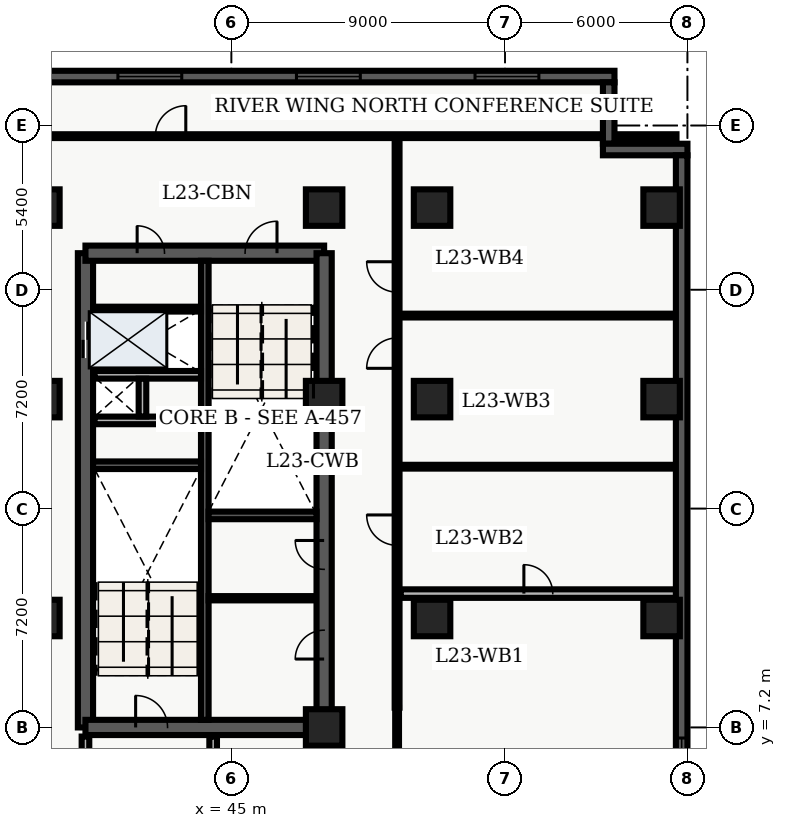
"""IFC4 building model, lengths in metres.
Left out: names, types, materials, properties, quantities, classifications, styles, units other than length and angle.
Written with IfcOpenShell. Run it as: python <this file> out.ifc"""

import sys

from ifc_helpers import new_model, entity, si_unit, converted_unit, direction, frame, origin_with_axes, origin_2d_with_axis, place, context, subcontext, project, spatial, polyline, rectangle, outline, extrude, element, fill, save


model = new_model("IFC4")
c1 = context("Model", 3, precision=1e-05, world=origin_with_axes(), true_north=direction((0.0, 1.0)))
c2 = subcontext(c1, "Body", "Model", "MODEL_VIEW")
j1 = project(units=[si_unit("LENGTHUNIT", "METRE"), converted_unit("PLANEANGLEUNIT", "DEGREE", entity("IfcPlaneAngleMeasure", 0.017), si_unit("PLANEANGLEUNIT", "RADIAN"), dimensions=[0, 0, 0, 0, 0, 0, 0])], contexts=[c1])
p1 = place(None, origin_with_axes())
s1 = spatial("IfcSite", under=j1, at=p1, CompositionType="ELEMENT")
p2 = place(p1, origin_with_axes())
s2 = spatial("IfcBuilding", under=s1, at=p2, CompositionType="ELEMENT")
p3 = place(p2, frame((0.0, 0.0, 96.9), z_axis=(0.0, 0.0, 1.0), x_axis=(1.0, 0.0, 0.0)))
s3 = spatial("IfcBuildingStorey", under=s2, at=p3, CompositionType="ELEMENT", Elevation=96.9)
p4 = place(p3, frame((40.2, 7.2, 0.0), z_axis=(0.0, 0.0, 1.0), x_axis=(0.0, 1.0, 0.0)))
e1 = element("IfcWall", 1, at=p4, inside=s3, PredefinedType="SHEAR", context=c2, shape_type="SweptSolid", body=[
    extrude(outline(polyline([(0.0, -0.25), (15.6, -0.25), (15.6, 0.25), (0.0, 0.25), (0.0, -0.25)])), origin_with_axes(), (0.0, 0.0, 1.0), 3.66),
])
p5 = place(p4, frame((12.75, 0.0, 0.0), z_axis=(0.0, 0.0, 1.0), x_axis=(1.0, 0.0, 0.0)))
e2 = element("IfcOpeningElement", 2, at=p5, cuts=e1, PredefinedType="OPENING", context=c2, shape_type="SweptSolid", body=[
    extrude(rectangle(XDim=1.2, YDim=0.52, at=origin_2d_with_axis()), origin_with_axes(), (0.0, 0.0, 1.0), 2.15),
])
p6 = place(p3, frame((40.2, 7.2, 0.0), z_axis=(0.0, 0.0, 1.0), x_axis=(1.0, 0.0, 0.0)))
e3 = element("IfcWall", 3, at=p6, inside=s3, PredefinedType="SHEAR", context=c2, shape_type="SweptSolid", body=[
    extrude(outline(polyline([(0.0, -0.25), (7.85, -0.25), (7.85, 0.25), (0.0, 0.25), (0.0, -0.25)])), origin_with_axes(), (0.0, 0.0, 1.0), 3.66),
])
p7 = place(p6, frame((2.175, 0.0, 0.0), z_axis=(0.0, 0.0, 1.0), x_axis=(1.0, 0.0, 0.0)))
e4 = element("IfcOpeningElement", 4, at=p7, cuts=e3, PredefinedType="OPENING", context=c2, shape_type="SweptSolid", body=[
    extrude(rectangle(XDim=1.05, YDim=0.52, at=origin_2d_with_axis()), origin_with_axes(), (0.0, 0.0, 1.0), 2.15),
])
p8 = place(p3, frame((40.2, 22.8, 0.0), z_axis=(0.0, 0.0, 1.0), x_axis=(1.0, 0.0, 0.0)))
e5 = element("IfcWall", 5, at=p8, inside=s3, PredefinedType="SHEAR", context=c2, shape_type="SweptSolid", body=[
    extrude(outline(polyline([(0.0, -0.25), (7.85, -0.25), (7.85, 0.25), (0.0, 0.25), (0.0, -0.25)])), origin_with_axes(), (0.0, 0.0, 1.0), 3.66),
])
p9 = place(p8, frame((5.775, 0.0, 0.0), z_axis=(0.0, 0.0, 1.0), x_axis=(1.0, 0.0, 0.0)))
e6 = element("IfcOpeningElement", 6, at=p9, cuts=e5, PredefinedType="OPENING", context=c2, shape_type="SweptSolid", body=[
    extrude(rectangle(XDim=1.05, YDim=0.52, at=origin_2d_with_axis()), origin_with_axes(), (0.0, 0.0, 1.0), 2.15),
])
p10 = place(p8, frame((2.15, 0.0, 0.0), z_axis=(0.0, 0.0, 1.0), x_axis=(1.0, 0.0, 0.0)))
e7 = element("IfcOpeningElement", 7, at=p10, cuts=e5, PredefinedType="OPENING", context=c2, shape_type="SweptSolid", body=[
    extrude(rectangle(XDim=0.9, YDim=0.52, at=origin_2d_with_axis()), origin_with_axes(), (0.0, 0.0, 1.0), 2.15),
])
p11 = place(p3, frame((48.05, 7.2, 0.0), z_axis=(0.0, 0.0, 1.0), x_axis=(0.0, 1.0, 0.0)))
e8 = element("IfcWall", 8, at=p11, inside=s3, PredefinedType="SHEAR", context=c2, shape_type="SweptSolid", body=[
    extrude(outline(polyline([(0.0, -0.25), (15.6, -0.25), (15.6, 0.25), (0.0, 0.25), (0.0, -0.25)])), origin_with_axes(), (0.0, 0.0, 1.0), 3.66),
])
p12 = place(p11, frame((2.725, 0.0, 0.0), z_axis=(0.0, 0.0, 1.0), x_axis=(1.0, 0.0, 0.0)))
e9 = element("IfcOpeningElement", 9, at=p12, cuts=e8, PredefinedType="OPENING", context=c2, shape_type="SweptSolid", body=[
    extrude(rectangle(XDim=0.95, YDim=0.52, at=origin_2d_with_axis()), origin_with_axes(), (0.0, 0.0, 1.0), 2.15),
])
p13 = place(p11, frame((5.675, 0.0, 0.0), z_axis=(0.0, 0.0, 1.0), x_axis=(1.0, 0.0, 0.0)))
e10 = element("IfcOpeningElement", 10, at=p13, cuts=e8, PredefinedType="OPENING", context=c2, shape_type="SweptSolid", body=[
    extrude(rectangle(XDim=0.95, YDim=0.52, at=origin_2d_with_axis()), origin_with_axes(), (0.0, 0.0, 1.0), 2.15),
])
p14 = place(p3, frame((44.125, 7.45, 0.0), z_axis=(0.0, 0.0, 1.0), x_axis=(0.0, 1.0, 0.0)))
e11 = element("IfcWall", 11, at=p14, inside=s3, PredefinedType="SHEAR", context=c2, shape_type="SweptSolid", body=[
    extrude(outline(polyline([(0.0, -0.125), (15.1, -0.125), (15.1, 0.125), (0.0, 0.125), (0.0, -0.125)])), origin_with_axes(), (0.0, 0.0, 1.0), 3.66),
])
for number, where, z_axis, x_axis in (
    (12, (40.45, 15.825, 0.0), (0.0, 0.0, 1.0), (1.0, 0.0, 0.0)),
    (13, (44.25, 14.175, 0.0), (0.0, 0.0, 1.0), (1.0, 0.0, 0.0)),
):
    element("IfcWall", number, at=place(p3, frame(where, z_axis=z_axis, x_axis=x_axis)), inside=s3, PredefinedType="SHEAR", context=c2, shape_type="SweptSolid", body=[
        extrude(outline(polyline([(0.0, -0.125), (3.55, -0.125), (3.55, 0.125), (0.0, 0.125), (0.0, -0.125)])), origin_with_axes(), (0.0, 0.0, 1.0), 3.66),
    ])
for number, where, z_axis, x_axis in (
    (14, (40.5, 17.3, 0.0), (0.0, 0.0, 1.0), (1.0, 0.0, 0.0)),
    (15, (40.5, 18.8, 0.0), (0.0, 0.0, 1.0), (1.0, 0.0, 0.0)),
):
    element("IfcWall", number, at=place(p3, frame(where, z_axis=z_axis, x_axis=x_axis)), inside=s3, PredefinedType="SOLIDWALL", context=c2, shape_type="SweptSolid", body=[
        extrude(outline(polyline([(0.0, -0.125), (3.5, -0.125), (3.5, 0.125), (0.0, 0.125), (0.0, -0.125)])), origin_with_axes(), (0.0, 0.0, 1.0), 2.7),
    ])
p15 = place(p3, frame((42.075, 17.43, 0.0), z_axis=(0.0, 0.0, 1.0), x_axis=(0.0, 1.0, 0.0)))
e16 = element("IfcWall", 16, at=p15, inside=s3, PredefinedType="SOLIDWALL", context=c2, shape_type="SweptSolid", body=[
    extrude(outline(polyline([(0.0, -0.125), (1.24, -0.125), (1.24, 0.125), (0.0, 0.125), (0.0, -0.125)])), origin_with_axes(), (0.0, 0.0, 1.0), 2.7),
])
p16 = place(p3, frame((40.2, 3.1, 0.0), z_axis=(0.0, 0.0, 1.0), x_axis=(0.0, 1.0, 0.0)))
e17 = element("IfcWall", 17, at=p16, inside=s3, PredefinedType="SOLIDWALL", context=c2, shape_type="SweptSolid", body=[
    extrude(outline(polyline([(0.0, -0.125), (3.8, -0.125), (3.8, 0.125), (0.0, 0.125), (0.0, -0.125)])), origin_with_axes(), (0.0, 0.0, 1.0), 2.7),
])
p17 = place(p3, frame((44.4, 3.1, 0.0), z_axis=(0.0, 0.0, 1.0), x_axis=(0.0, 1.0, 0.0)))
e18 = element("IfcWall", 18, at=p17, inside=s3, PredefinedType="SOLIDWALL", context=c2, shape_type="SweptSolid", body=[
    extrude(outline(polyline([(0.0, -0.125), (3.8, -0.125), (3.8, 0.125), (0.0, 0.125), (0.0, -0.125)])), origin_with_axes(), (0.0, 0.0, 1.0), 2.7),
])
p18 = place(p17, frame((2.075, 0.0, 0.0), z_axis=(0.0, 0.0, 1.0), x_axis=(1.0, 0.0, 0.0)))
e19 = element("IfcOpeningElement", 19, at=p18, cuts=e18, PredefinedType="OPENING", context=c2, shape_type="SweptSolid", body=[
    extrude(rectangle(XDim=1.05, YDim=0.27, at=origin_2d_with_axis()), origin_with_axes(), (0.0, 0.0, 1.0), 2.15),
])
for number, where, z_axis, x_axis in (
    (20, (38.75, 10.8, 0.0), (0.0, 0.0, 1.0), (1.0, 0.0, 0.0)),
    (21, (38.75, 18.0, 0.0), (0.0, 0.0, 1.0), (1.0, 0.0, 0.0)),
    (22, (38.75, 24.3, 0.0), (0.0, 0.0, 1.0), (1.0, 0.0, 0.0)),
    (23, (48.05, 7.2, 0.0), (0.0, 0.0, 1.0), (1.0, 0.0, 0.0)),
    (24, (48.05, 18.0, 0.0), (0.0, 0.0, 1.0), (1.0, 0.0, 0.0)),
    (25, (48.05, 24.3, 0.0), (0.0, 0.0, 1.0), (1.0, 0.0, 0.0)),
    (26, (51.6, 10.8, 0.0), (0.0, 0.0, 1.0), (1.0, 0.0, 0.0)),
    (27, (51.6, 18.0, 0.0), (0.0, 0.0, 1.0), (1.0, 0.0, 0.0)),
    (28, (51.6, 24.3, 0.0), (0.0, 0.0, 1.0), (1.0, 0.0, 0.0)),
    (29, (59.15, 10.8, 0.0), (0.0, 0.0, 1.0), (1.0, 0.0, 0.0)),
    (30, (59.15, 18.0, 0.0), (0.0, 0.0, 1.0), (1.0, 0.0, 0.0)),
    (31, (59.15, 24.3, 0.0), (0.0, 0.0, 1.0), (1.0, 0.0, 0.0)),
):
    element("IfcColumn", number, at=place(p3, frame(where, z_axis=z_axis, x_axis=x_axis)), inside=s3, PredefinedType="COLUMN", context=c2, shape_type="SweptSolid", body=[
        extrude(rectangle(XDim=1.2, YDim=1.2, at=origin_2d_with_axis()), origin_with_axes(), (0.0, 0.0, 1.0), 3.9),
    ])
p19 = place(p3, frame((40.5, 20.96, 0.0), z_axis=(0.0, 0.0, 1.0), x_axis=(1.0, 0.0, 0.0)))
e32 = element("IfcWall", 32, at=p19, inside=s3, PredefinedType="PARTITIONING", context=c2, shape_type="SweptSolid", body=[
    extrude(outline(polyline([(0.0, -0.08), (3.5, -0.08), (3.5, 0.08), (0.0, 0.08), (0.0, -0.08)])), origin_with_axes(), (0.0, 0.0, 1.0), 2.7),
])
p20 = place(p3, frame((44.25, 11.45, 0.0), z_axis=(0.0, 0.0, 1.0), x_axis=(1.0, 0.0, 0.0)))
e33 = element("IfcWall", 33, at=p20, inside=s3, PredefinedType="PARTITIONING", context=c2, shape_type="SweptSolid", body=[
    extrude(outline(polyline([(0.0, -0.07), (3.5, -0.07), (3.5, 0.07), (0.0, 0.07), (0.0, -0.07)])), origin_with_axes(), (0.0, 0.0, 1.0), 2.7),
])
p21 = place(p3, frame((50.45, 7.85, 0.0), z_axis=(0.0, 0.0, 1.0), x_axis=(0.0, 1.0, 0.0)))
e34 = element("IfcWall", 34, at=p21, inside=s3, PredefinedType="PARTITIONING", context=c2, shape_type="SweptSolid", body=[
    extrude(outline(polyline([(0.0, -0.08), (18.8, -0.08), (18.8, 0.08), (0.0, 0.08), (0.0, -0.08)])), origin_with_axes(), (0.0, 0.0, 1.0), 2.7),
])
p22 = place(p21, frame((5.84, 0.0, 0.0), z_axis=(0.0, 0.0, 1.0), x_axis=(1.0, 0.0, 0.0)))
e35 = element("IfcOpeningElement", 35, at=p22, cuts=e34, PredefinedType="OPENING", context=c2, shape_type="SweptSolid", body=[
    extrude(rectangle(XDim=1.0, YDim=0.18, at=origin_2d_with_axis()), origin_with_axes(), (0.0, 0.0, 1.0), 2.15),
])
p23 = place(p21, frame((11.663, 0.0, 0.0), z_axis=(0.0, 0.0, 1.0), x_axis=(1.0, 0.0, 0.0)))
e36 = element("IfcOpeningElement", 36, at=p23, cuts=e34, PredefinedType="OPENING", context=c2, shape_type="SweptSolid", body=[
    extrude(rectangle(XDim=1.0, YDim=0.18, at=origin_2d_with_axis()), origin_with_axes(), (0.0, 0.0, 1.0), 2.15),
])
p24 = place(p21, frame((14.169, 0.0, 0.0), z_axis=(0.0, 0.0, 1.0), x_axis=(1.0, 0.0, 0.0)))
e37 = element("IfcOpeningElement", 37, at=p24, cuts=e34, PredefinedType="OPENING", context=c2, shape_type="SweptSolid", body=[
    extrude(rectangle(XDim=1.0, YDim=0.18, at=origin_2d_with_axis()), origin_with_axes(), (0.0, 0.0, 1.0), 2.15),
])
p25 = place(p3, frame((38.76, 26.65, 0.0), z_axis=(0.0, 0.0, 1.0), x_axis=(1.0, 0.0, 0.0)))
e38 = element("IfcWall", 38, at=p25, inside=s3, PredefinedType="PARTITIONING", context=c2, shape_type="SweptSolid", body=[
    extrude(outline(polyline([(0.0, -0.062), (20.88, -0.062), (20.88, 0.062), (0.0, 0.062), (0.0, -0.062)])), origin_with_axes(), (0.0, 0.0, 1.0), 2.7),
])
p26 = place(p25, frame((4.24, 0.0, 0.0), z_axis=(0.0, 0.0, 1.0), x_axis=(1.0, 0.0, 0.0)))
e39 = element("IfcOpeningElement", 39, at=p26, cuts=e38, PredefinedType="OPENING", context=c2, shape_type="SweptSolid", body=[
    extrude(rectangle(XDim=1.0, YDim=0.145, at=origin_2d_with_axis()), origin_with_axes(), (0.0, 0.0, 1.0), 2.15),
])
p27 = place(p3, frame((50.45, 0.36, 0.0), z_axis=(0.0, 0.0, 1.0), x_axis=(0.0, 1.0, 0.0)))
e40 = element("IfcWall", 40, at=p27, inside=s3, PredefinedType="PARTITIONING", context=c2, shape_type="SweptSolid", body=[
    extrude(outline(polyline([(0.0, -0.062), (7.49, -0.062), (7.49, 0.062), (0.0, 0.062), (0.0, -0.062)])), origin_with_axes(), (0.0, 0.0, 1.0), 2.7),
])
p28 = place(p27, frame((5.1, 0.0, 0.0), z_axis=(0.0, 0.0, 1.0), x_axis=(1.0, 0.0, 0.0)))
e41 = element("IfcOpeningElement", 41, at=p28, cuts=e40, PredefinedType="OPENING", context=c2, shape_type="SweptSolid", body=[
    extrude(rectangle(XDim=1.0, YDim=0.145, at=origin_2d_with_axis()), origin_with_axes(), (0.0, 0.0, 1.0), 2.15),
])
p29 = place(p3, frame((50.57, 11.603, 0.0), z_axis=(0.0, 0.0, 1.0), x_axis=(1.0, 0.0, 0.0)))
e42 = element("IfcWall", 42, at=p29, inside=s3, PredefinedType="PARTITIONING", context=c2, shape_type="SweptSolid", body=[
    extrude(outline(polyline([(0.0, -0.14), (9.055, -0.14), (9.055, 0.14), (0.0, 0.14), (0.0, -0.14)])), origin_with_axes(), (0.0, 0.0, 1.0), 2.7),
])
p30 = place(p29, frame((4.525, 0.0, 0.0), z_axis=(0.0, 0.0, 1.0), x_axis=(1.0, 0.0, 0.0)))
e43 = element("IfcOpeningElement", 43, at=p30, cuts=e42, PredefinedType="OPENING", context=c2, shape_type="SweptSolid", body=[
    extrude(rectangle(XDim=0.95, YDim=0.3, at=origin_2d_with_axis()), origin_with_axes(), (0.0, 0.0, 1.0), 2.15),
])
for number, where, z_axis, x_axis in (
    (44, (50.57, 15.777, 0.0), (0.0, 0.0, 1.0), (1.0, 0.0, 0.0)),
    (45, (50.57, 20.748, 0.0), (0.0, 0.0, 1.0), (1.0, 0.0, 0.0)),
):
    element("IfcWall", number, at=place(p3, frame(where, z_axis=z_axis, x_axis=x_axis)), inside=s3, PredefinedType="PARTITIONING", context=c2, shape_type="SweptSolid", body=[
        extrude(outline(polyline([(0.0, -0.062), (9.055, -0.062), (9.055, 0.062), (0.0, 0.062), (0.0, -0.062)])), origin_with_axes(), (0.0, 0.0, 1.0), 2.7),
    ])
p31 = place(p3, frame((38.78, 28.61, 0.0), z_axis=(0.0, 0.0, 1.0), x_axis=(1.0, 0.0, 0.0)))
e46 = element("IfcWall", 46, at=p31, inside=s3, PredefinedType="SOLIDWALL", context=c2, shape_type="SweptSolid", body=[
    extrude(outline(polyline([(0.0, -0.19), (18.82, -0.19), (18.82, 0.19), (0.0, 0.19), (0.0, -0.19)])), origin_with_axes(), (0.0, 0.0, 1.0), 3.66),
])
p32 = place(p31, frame((3.537, 0.0, 0.45), z_axis=(0.0, 0.0, 1.0), x_axis=(1.0, 0.0, 0.0)))
e47 = element("IfcOpeningElement", 47, at=p32, cuts=e46, PredefinedType="OPENING", context=c2, shape_type="SweptSolid", body=[
    extrude(rectangle(XDim=2.1, YDim=0.4, at=origin_2d_with_axis()), origin_with_axes(), (0.0, 0.0, 1.0), 2.2),
])
p33 = place(p31, frame((9.41, 0.0, 0.45), z_axis=(0.0, 0.0, 1.0), x_axis=(1.0, 0.0, 0.0)))
e48 = element("IfcOpeningElement", 48, at=p33, cuts=e46, PredefinedType="OPENING", context=c2, shape_type="SweptSolid", body=[
    extrude(rectangle(XDim=2.1, YDim=0.4, at=origin_2d_with_axis()), origin_with_axes(), (0.0, 0.0, 1.0), 2.2),
])
p34 = place(p31, frame((15.283, 0.0, 0.45), z_axis=(0.0, 0.0, 1.0), x_axis=(1.0, 0.0, 0.0)))
e49 = element("IfcOpeningElement", 49, at=p34, cuts=e46, PredefinedType="OPENING", context=c2, shape_type="SweptSolid", body=[
    extrude(rectangle(XDim=2.1, YDim=0.4, at=origin_2d_with_axis()), origin_with_axes(), (0.0, 0.0, 1.0), 2.2),
])
p35 = place(p3, frame((57.41, 28.42, 0.0), z_axis=(0.0, 0.0, 1.0), x_axis=(0.0, -1.0, 0.0)))
e50 = element("IfcWall", 50, at=p35, inside=s3, PredefinedType="SOLIDWALL", context=c2, shape_type="SweptSolid", body=[
    extrude(outline(polyline([(0.0, -0.19), (2.02, -0.19), (2.02, 0.19), (0.0, 0.19), (0.0, -0.19)])), origin_with_axes(), (0.0, 0.0, 1.0), 3.66),
])
p36 = place(p3, frame((57.22, 26.21, 0.0), z_axis=(0.0, 0.0, 1.0), x_axis=(1.0, 0.0, 0.0)))
e51 = element("IfcWall", 51, at=p36, inside=s3, PredefinedType="SOLIDWALL", context=c2, shape_type="SweptSolid", body=[
    extrude(outline(polyline([(0.0, -0.19), (2.78, -0.19), (2.78, 0.19), (0.0, 0.19), (0.0, -0.19)])), origin_with_axes(), (0.0, 0.0, 1.0), 3.66),
])
p37 = place(p3, frame((59.81, 26.02, 0.0), z_axis=(0.0, 0.0, 1.0), x_axis=(0.0, -1.0, 0.0)))
e52 = element("IfcWall", 52, at=p37, inside=s3, PredefinedType="SOLIDWALL", context=c2, shape_type="SweptSolid", body=[
    extrude(outline(polyline([(0.0, -0.19), (23.62, -0.19), (23.62, 0.19), (0.0, 0.19), (0.0, -0.19)])), origin_with_axes(), (0.0, 0.0, 1.0), 3.66),
])
p38 = place(p37, frame((20.218, 0.0, 0.45), z_axis=(0.0, 0.0, 1.0), x_axis=(1.0, 0.0, 0.0)))
e53 = element("IfcOpeningElement", 53, at=p38, cuts=e52, PredefinedType="OPENING", context=c2, shape_type="SweptSolid", body=[
    extrude(rectangle(XDim=2.1, YDim=0.4, at=origin_2d_with_axis()), origin_with_axes(), (0.0, 0.0, 1.0), 2.2),
])
p39 = place(p4, frame((12.75, 0.0, 0.0), z_axis=(0.0, 0.0, 1.0), x_axis=(1.0, 0.0, 0.0)))
e54 = element("IfcDoor", 54, at=p39, inside=s3, OperationType="DOUBLE_DOOR_SLIDING", PredefinedType="DOOR", context=c2, shape_type="SweptSolid", body=[
    extrude(rectangle(XDim=1.2, YDim=0.09, at=origin_2d_with_axis()), origin_with_axes(), (0.0, 0.0, 1.0), 2.15),
])
fill(e2, e54)
p40 = place(p6, frame((2.175, 0.0, 0.0), z_axis=(0.0, 0.0, 1.0), x_axis=(1.0, 0.0, 0.0)))
e55 = element("IfcDoor", 55, at=p40, inside=s3, OperationType="SINGLE_SWING_LEFT", PredefinedType="DOOR", context=c2, shape_type="SweptSolid", body=[
    extrude(rectangle(XDim=1.05, YDim=0.09, at=origin_2d_with_axis()), origin_with_axes(), (0.0, 0.0, 1.0), 2.15),
])
fill(e4, e55)
p41 = place(p8, frame((5.775, 0.0, 0.0), z_axis=(0.0, 0.0, 1.0), x_axis=(1.0, 0.0, 0.0)))
e56 = element("IfcDoor", 56, at=p41, inside=s3, OperationType="SINGLE_SWING_RIGHT", PredefinedType="DOOR", context=c2, shape_type="SweptSolid", body=[
    extrude(rectangle(XDim=1.05, YDim=0.09, at=origin_2d_with_axis()), origin_with_axes(), (0.0, 0.0, 1.0), 2.15),
])
fill(e6, e56)
p42 = place(p8, frame((2.15, 0.0, 0.0), z_axis=(0.0, 0.0, 1.0), x_axis=(1.0, 0.0, 0.0)))
e57 = element("IfcDoor", 57, at=p42, inside=s3, OperationType="SINGLE_SWING_LEFT", PredefinedType="DOOR", context=c2, shape_type="SweptSolid", body=[
    extrude(rectangle(XDim=0.9, YDim=0.09, at=origin_2d_with_axis()), origin_with_axes(), (0.0, 0.0, 1.0), 2.15),
])
fill(e7, e57)
p43 = place(p11, frame((2.725, 0.0, 0.0), z_axis=(0.0, 0.0, 1.0), x_axis=(1.0, 0.0, 0.0)))
e58 = element("IfcDoor", 58, at=p43, inside=s3, OperationType="SINGLE_SWING_LEFT", PredefinedType="DOOR", context=c2, shape_type="SweptSolid", body=[
    extrude(rectangle(XDim=0.95, YDim=0.09, at=origin_2d_with_axis()), origin_with_axes(), (0.0, 0.0, 1.0), 2.15),
])
fill(e9, e58)
p44 = place(p11, frame((5.675, 0.0, 0.0), z_axis=(0.0, 0.0, 1.0), x_axis=(1.0, 0.0, 0.0)))
e59 = element("IfcDoor", 59, at=p44, inside=s3, OperationType="SINGLE_SWING_RIGHT", PredefinedType="DOOR", context=c2, shape_type="SweptSolid", body=[
    extrude(rectangle(XDim=0.95, YDim=0.09, at=origin_2d_with_axis()), origin_with_axes(), (0.0, 0.0, 1.0), 2.15),
])
fill(e10, e59)
p45 = place(p25, frame((4.24, 0.0, 0.0), z_axis=(0.0, 0.0, 1.0), x_axis=(1.0, 0.0, 0.0)))
e60 = element("IfcDoor", 60, at=p45, inside=s3, OperationType="SINGLE_SWING_RIGHT", PredefinedType="DOOR", context=c2, shape_type="SweptSolid", body=[
    extrude(rectangle(XDim=1.0, YDim=0.075, at=origin_2d_with_axis()), origin_with_axes(), (0.0, 0.0, 1.0), 2.15),
])
fill(e39, e60)
p46 = place(p29, frame((4.525, 0.0, 0.0), z_axis=(0.0, 0.0, 1.0), x_axis=(1.0, 0.0, 0.0)))
e61 = element("IfcDoor", 61, at=p46, inside=s3, OperationType="SINGLE_SWING_LEFT", PredefinedType="DOOR", context=c2, shape_type="SweptSolid", body=[
    extrude(rectangle(XDim=0.95, YDim=0.09, at=origin_2d_with_axis()), origin_with_axes(), (0.0, 0.0, 1.0), 2.15),
])
fill(e43, e61)
p47 = place(p21, frame((5.84, 0.0, 0.0), z_axis=(0.0, 0.0, 1.0), x_axis=(1.0, 0.0, 0.0)))
e62 = element("IfcDoor", 62, at=p47, inside=s3, OperationType="SINGLE_SWING_RIGHT", PredefinedType="DOOR", context=c2, shape_type="SweptSolid", body=[
    extrude(rectangle(XDim=1.0, YDim=0.09, at=origin_2d_with_axis()), origin_with_axes(), (0.0, 0.0, 1.0), 2.15),
])
fill(e35, e62)
p48 = place(p21, frame((11.663, 0.0, 0.0), z_axis=(0.0, 0.0, 1.0), x_axis=(1.0, 0.0, 0.0)))
e63 = element("IfcDoor", 63, at=p48, inside=s3, OperationType="SINGLE_SWING_LEFT", PredefinedType="DOOR", context=c2, shape_type="SweptSolid", body=[
    extrude(rectangle(XDim=1.0, YDim=0.09, at=origin_2d_with_axis()), origin_with_axes(), (0.0, 0.0, 1.0), 2.15),
])
fill(e36, e63)
p49 = place(p21, frame((14.169, 0.0, 0.0), z_axis=(0.0, 0.0, 1.0), x_axis=(1.0, 0.0, 0.0)))
e64 = element("IfcDoor", 64, at=p49, inside=s3, OperationType="SINGLE_SWING_RIGHT", PredefinedType="DOOR", context=c2, shape_type="SweptSolid", body=[
    extrude(rectangle(XDim=1.0, YDim=0.09, at=origin_2d_with_axis()), origin_with_axes(), (0.0, 0.0, 1.0), 2.15),
])
fill(e37, e64)
p50 = place(p31, frame((3.537, 0.0, 0.45), z_axis=(0.0, 0.0, 1.0), x_axis=(1.0, 0.0, 0.0)))
e65 = element("IfcWindow", 65, at=p50, inside=s3, PredefinedType="WINDOW", context=c2, shape_type="SweptSolid", body=[
    extrude(rectangle(XDim=2.1, YDim=0.09, at=origin_2d_with_axis()), origin_with_axes(), (0.0, 0.0, 1.0), 2.2),
])
fill(e47, e65)
p51 = place(p31, frame((9.41, 0.0, 0.45), z_axis=(0.0, 0.0, 1.0), x_axis=(1.0, 0.0, 0.0)))
e66 = element("IfcWindow", 66, at=p51, inside=s3, PredefinedType="WINDOW", context=c2, shape_type="SweptSolid", body=[
    extrude(rectangle(XDim=2.1, YDim=0.09, at=origin_2d_with_axis()), origin_with_axes(), (0.0, 0.0, 1.0), 2.2),
])
fill(e48, e66)
p52 = place(p31, frame((15.283, 0.0, 0.45), z_axis=(0.0, 0.0, 1.0), x_axis=(1.0, 0.0, 0.0)))
e67 = element("IfcWindow", 67, at=p52, inside=s3, PredefinedType="WINDOW", context=c2, shape_type="SweptSolid", body=[
    extrude(rectangle(XDim=2.1, YDim=0.09, at=origin_2d_with_axis()), origin_with_axes(), (0.0, 0.0, 1.0), 2.2),
])
fill(e49, e67)
p53 = place(p37, frame((20.218, 0.0, 0.45), z_axis=(0.0, 0.0, 1.0), x_axis=(1.0, 0.0, 0.0)))
e68 = element("IfcWindow", 68, at=p53, inside=s3, PredefinedType="WINDOW", context=c2, shape_type="SweptSolid", body=[
    extrude(rectangle(XDim=2.1, YDim=0.09, at=origin_2d_with_axis()), origin_with_axes(), (0.0, 0.0, 1.0), 2.2),
])
fill(e53, e68)
save(model, sys.argv[1])
